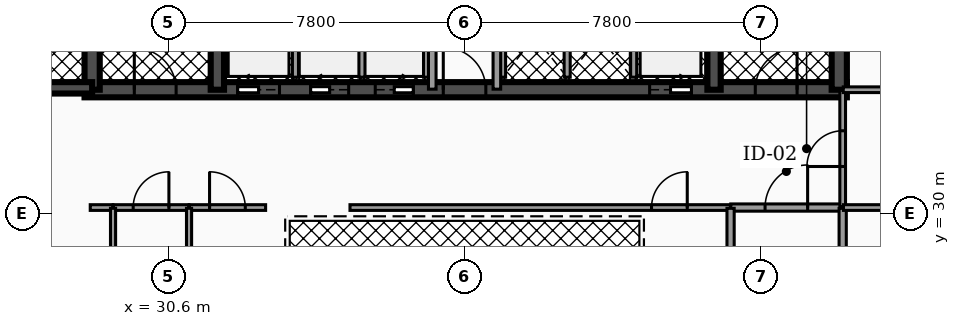
"""IFC4 building model, lengths in metres.
Left out: names, types, materials, properties, quantities, classifications, styles, units other than length and angle.
Written with IfcOpenShell. Run it as: python <this file> out.ifc"""

import sys

from ifc_helpers import new_model, si_unit, direction, frame, frame_2d, origin, place, context, subcontext, project, spatial, rectangle, extrude, element, fill, save


model = new_model("IFC4")
c1 = context("Model", 3, precision=1e-05, world=origin(), true_north=direction((0.0, 1.0)))
c2 = subcontext(c1, "Body", "Model", "MODEL_VIEW")
j1 = project(units=[si_unit("LENGTHUNIT", "METRE"), si_unit("PLANEANGLEUNIT", "RADIAN")], contexts=[c1])
p1 = place(None, origin())
s1 = spatial("IfcSite", under=j1, at=p1, CompositionType="ELEMENT")
p2 = place(p1, origin())
s2 = spatial("IfcBuilding", under=s1, at=p2, CompositionType="ELEMENT")
p3 = place(p2, frame((0.0, 0.0, 123.42)))
s3 = spatial("IfcBuildingStorey", under=s2, at=p3, CompositionType="ELEMENT", Elevation=123.42)
p4 = place(p3, frame((28.4, 33.25, 0.0), z_axis=(0.0, 0.0, 1.0), x_axis=(1.0, 0.0, 0.0)))
e1 = element("IfcWall", 1, at=p4, inside=s3, PredefinedType="SHEAR", context=c2, shape_type="SweptSolid", body=[
    extrude(rectangle(XDim=20.06, YDim=0.4, at=frame_2d((10.03, 0.0))), origin(), (0.0, 0.0, 1.0), 3.5),
])
p5 = place(p4, frame((4.03, 0.0, 0.0)))
e2 = element("IfcOpeningElement", 2, at=p5, cuts=e1, PredefinedType="OPENING", context=c2, shape_type="SweptSolid", body=[
    extrude(rectangle(XDim=1.1, YDim=2.15, at=frame_2d((0.55, 1.075))), frame((0.0, 0.21, 0.0), z_axis=(0.0, -1.0, 0.0), x_axis=(1.0, 0.0, 0.0)), (0.0, 0.0, 1.0), 0.42),
])
p6 = place(p4, frame((14.87, 0.0, 0.0)))
e3 = element("IfcOpeningElement", 3, at=p6, cuts=e1, PredefinedType="OPENING", context=c2, shape_type="SweptSolid", body=[
    extrude(rectangle(XDim=1.1, YDim=2.15, at=frame_2d((0.55, 1.075))), frame((0.0, 0.21, 0.0), z_axis=(0.0, -1.0, 0.0), x_axis=(1.0, 0.0, 0.0)), (0.0, 0.0, 1.0), 0.42),
])
p7 = place(p4, frame((5.95, 0.0, 0.0)))
e4 = element("IfcOpeningElement", 4, at=p7, cuts=e1, PredefinedType="OPENING", context=c2, shape_type="SweptSolid", body=[
    extrude(rectangle(XDim=1.0, YDim=2.1, at=frame_2d((0.5, 1.05))), frame((0.0, 0.21, 0.0), z_axis=(0.0, -1.0, 0.0), x_axis=(1.0, 0.0, 0.0)), (0.0, 0.0, 1.0), 0.42),
])
p8 = place(p4, frame((7.65, 0.0, 0.0)))
e5 = element("IfcOpeningElement", 5, at=p8, cuts=e1, PredefinedType="OPENING", context=c2, shape_type="SweptSolid", body=[
    extrude(rectangle(XDim=1.0, YDim=2.1, at=frame_2d((0.5, 1.05))), frame((0.0, 0.21, 0.0), z_axis=(0.0, -1.0, 0.0), x_axis=(1.0, 0.0, 0.0)), (0.0, 0.0, 1.0), 0.42),
])
p9 = place(p4, frame((1.31, 0.0, 0.0)))
e6 = element("IfcOpeningElement", 6, at=p9, cuts=e1, PredefinedType="OPENING", context=c2, shape_type="SweptSolid", body=[
    extrude(rectangle(XDim=1.1, YDim=2.2, at=frame_2d((0.55, 1.1))), frame((0.0, 0.21, 0.0), z_axis=(0.0, -1.0, 0.0), x_axis=(1.0, 0.0, 0.0)), (0.0, 0.0, 1.0), 0.42),
])
p10 = place(p4, frame((9.44, 0.0, 0.0)))
e7 = element("IfcOpeningElement", 7, at=p10, cuts=e1, PredefinedType="OPENING", context=c2, shape_type="SweptSolid", body=[
    extrude(rectangle(XDim=1.12, YDim=2.05, at=frame_2d((0.56, 1.025))), frame((0.0, 0.21, 0.0), z_axis=(0.0, -1.0, 0.0), x_axis=(1.0, 0.0, 0.0)), (0.0, 0.0, 1.0), 0.42),
])
p11 = place(p4, frame((17.65, 0.0, 0.0)))
e8 = element("IfcOpeningElement", 8, at=p11, cuts=e1, PredefinedType="OPENING", context=c2, shape_type="SweptSolid", body=[
    extrude(rectangle(XDim=1.1, YDim=2.2, at=frame_2d((0.55, 1.1))), frame((0.0, 0.21, 0.0), z_axis=(0.0, -1.0, 0.0), x_axis=(1.0, 0.0, 0.0)), (0.0, 0.0, 1.0), 0.42),
])
p12 = place(p3, frame((28.6, 33.25, 0.0), z_axis=(0.0, 0.0, 1.0), x_axis=(0.0, 1.0, 0.0)))
e9 = element("IfcWall", 9, at=p12, inside=s3, PredefinedType="SHEAR", context=c2, shape_type="SweptSolid", body=[
    extrude(rectangle(XDim=10.2, YDim=0.4, at=frame_2d((5.1, 0.0))), origin(), (0.0, 0.0, 1.0), 3.5),
])
for number, where, z_axis, x_axis in (
    (10, (31.895, 33.25, 0.0), (0.0, 0.0, 1.0), (0.0, 1.0, 0.0)),
    (11, (44.965, 33.25, 0.0), (0.0, 0.0, 1.0), (0.0, 1.0, 0.0)),
):
    element("IfcWall", number, at=place(p3, frame(where, z_axis=z_axis, x_axis=x_axis)), inside=s3, PredefinedType="SHEAR", context=c2, shape_type="SweptSolid", body=[
        extrude(rectangle(XDim=10.2, YDim=0.35, at=frame_2d((5.1, 0.0))), origin(), (0.0, 0.0, 1.0), 3.5),
    ])
p13 = place(p3, frame((48.26, 33.25, 0.0), z_axis=(0.0, 0.0, 1.0), x_axis=(0.0, 1.0, 0.0)))
e12 = element("IfcWall", 12, at=p13, inside=s3, PredefinedType="SHEAR", context=c2, shape_type="SweptSolid", body=[
    extrude(rectangle(XDim=10.2, YDim=0.4, at=frame_2d((5.1, 0.0))), origin(), (0.0, 0.0, 1.0), 3.5),
])
p14 = place(p3, frame((25.08, 33.3, 0.0), z_axis=(0.0, 0.0, 1.0), x_axis=(1.0, 0.0, 0.0)))
e13 = element("IfcWall", 13, at=p14, inside=s3, PredefinedType="SHEAR", context=c2, shape_type="SweptSolid", body=[
    extrude(rectangle(XDim=3.52, YDim=0.3, at=frame_2d((1.76, 0.0))), origin(), (0.0, 0.0, 1.0), 3.5),
])
p15 = place(p14, frame((1.335, 0.0, 0.0)))
e14 = element("IfcOpeningElement", 14, at=p15, cuts=e13, PredefinedType="OPENING", context=c2, shape_type="SweptSolid", body=[
    extrude(rectangle(XDim=0.95, YDim=2.2, at=frame_2d((0.475, 1.1))), frame((0.0, 0.16, 0.0), z_axis=(0.0, -1.0, 0.0), x_axis=(1.0, 0.0, 0.0)), (0.0, 0.0, 1.0), 0.32),
])
for number, where, z_axis, x_axis in (
    (15, (33.95, 33.58, 0.0), (0.0, 0.0, 1.0), (0.0, 1.0, 0.0)),
    (16, (42.85, 33.58, 0.0), (0.0, 0.0, 1.0), (0.0, 1.0, 0.0)),
):
    element("IfcWall", number, at=place(p3, frame(where, z_axis=z_axis, x_axis=x_axis)), inside=s3, PredefinedType="SOLIDWALL", context=c2, shape_type="SweptSolid", body=[
        extrude(rectangle(XDim=2.45, YDim=0.16, at=frame_2d((1.225, 0.0))), origin(), (0.0, 0.0, 1.0), 2.472),
    ])
for number, where, z_axis, x_axis in (
    (17, (35.7, 33.58, 0.0), (0.0, 0.0, 1.0), (0.0, 1.0, 0.0)),
    (18, (37.4, 33.58, 0.0), (0.0, 0.0, 1.0), (0.0, 1.0, 0.0)),
    (19, (39.4, 33.58, 0.0), (0.0, 0.0, 1.0), (0.0, 1.0, 0.0)),
    (20, (41.1, 33.58, 0.0), (0.0, 0.0, 1.0), (0.0, 1.0, 0.0)),
):
    element("IfcWall", number, at=place(p3, frame(where, z_axis=z_axis, x_axis=x_axis)), inside=s3, PredefinedType="SOLIDWALL", context=c2, shape_type="SweptSolid", body=[
        extrude(rectangle(XDim=2.25, YDim=0.16, at=frame_2d((1.125, 0.0))), origin(), (0.0, 0.0, 1.0), 2.472),
    ])
p16 = place(p3, frame((37.55, 33.265, 0.0), z_axis=(0.0, 0.0, 1.0), x_axis=(0.0, 1.0, 0.0)))
e21 = element("IfcWall", 21, at=p16, inside=s3, PredefinedType="PARTITIONING", context=c2, shape_type="SweptSolid", body=[
    extrude(rectangle(XDim=4.265, YDim=0.2, at=frame_2d((2.133, 0.0))), origin(), (0.0, 0.0, 1.0), 2.457),
])
p17 = place(p16, frame((3.093, 0.0, 0.0)))
e22 = element("IfcOpeningElement", 22, at=p17, cuts=e21, PredefinedType="OPENING", context=c2, shape_type="SweptSolid", body=[
    extrude(rectangle(XDim=0.88, YDim=2.05, at=frame_2d((0.44, 1.025))), frame((0.0, 0.11, 0.0), z_axis=(0.0, -1.0, 0.0), x_axis=(1.0, 0.0, 0.0)), (0.0, 0.0, 1.0), 0.22),
])
p18 = place(p3, frame((39.25, 33.265, 0.0), z_axis=(0.0, 0.0, 1.0), x_axis=(0.0, 1.0, 0.0)))
e23 = element("IfcWall", 23, at=p18, inside=s3, PredefinedType="PARTITIONING", context=c2, shape_type="SweptSolid", body=[
    extrude(rectangle(XDim=4.265, YDim=0.2, at=frame_2d((2.133, 0.0))), origin(), (0.0, 0.0, 1.0), 2.457),
])
p19 = place(p18, frame((3.093, 0.0, 0.0)))
e24 = element("IfcOpeningElement", 24, at=p19, cuts=e23, PredefinedType="OPENING", context=c2, shape_type="SweptSolid", body=[
    extrude(rectangle(XDim=0.88, YDim=2.05, at=frame_2d((0.44, 1.025))), frame((0.0, 0.11, 0.0), z_axis=(0.0, -1.0, 0.0), x_axis=(1.0, 0.0, 0.0)), (0.0, 0.0, 1.0), 0.22),
])
p20 = place(p3, frame((45.405, 30.15, 0.0), z_axis=(0.0, 0.0, 1.0), x_axis=(1.0, 0.0, 0.0)))
e25 = element("IfcWall", 25, at=p20, inside=s3, PredefinedType="PARTITIONING", context=c2, shape_type="SweptSolid", body=[
    extrude(rectangle(XDim=2.925, YDim=0.19, at=frame_2d((1.462, 0.0))), origin(), (0.0, 0.0, 1.0), 2.457),
])
p21 = place(p20, frame((0.903, 0.0, 0.0)))
e26 = element("IfcOpeningElement", 26, at=p21, cuts=e25, PredefinedType="OPENING", context=c2, shape_type="SweptSolid", body=[
    extrude(rectangle(XDim=1.12, YDim=2.05, at=frame_2d((0.56, 1.025))), frame((0.0, 0.105, 0.0), z_axis=(0.0, -1.0, 0.0), x_axis=(1.0, 0.0, 0.0)), (0.0, 0.0, 1.0), 0.21),
])
p22 = place(p3, frame((48.35, 30.17, 0.0), z_axis=(0.0, 0.0, 1.0), x_axis=(0.0, 1.0, 0.0)))
e27 = element("IfcWall", 27, at=p22, inside=s3, PredefinedType="PARTITIONING", context=c2, shape_type="SweptSolid", body=[
    extrude(rectangle(XDim=3.06, YDim=0.15, at=frame_2d((1.53, 0.0))), origin(), (0.0, 0.0, 1.0), 2.457),
])
p23 = place(p22, frame((1.06, 0.0, 0.0)))
e28 = element("IfcOpeningElement", 28, at=p23, cuts=e27, PredefinedType="OPENING", context=c2, shape_type="SweptSolid", body=[
    extrude(rectangle(XDim=0.94, YDim=2.05, at=frame_2d((0.47, 1.025))), frame((0.0, 0.085, 0.0), z_axis=(0.0, -1.0, 0.0), x_axis=(1.0, 0.0, 0.0)), (0.0, 0.0, 1.0), 0.17),
])
p24 = place(p3, frame((28.55, 30.15, 0.0), z_axis=(0.0, 0.0, 1.0), x_axis=(1.0, 0.0, 0.0)))
e29 = element("IfcWall", 29, at=p24, inside=s3, PredefinedType="PARTITIONING", context=c2, shape_type="SweptSolid", body=[
    extrude(rectangle(XDim=0.595, YDim=0.15, at=frame_2d((0.297, 0.0))), origin(), (0.0, 0.0, 1.0), 2.457),
])
p25 = place(p3, frame((29.155, 30.15, 0.0), z_axis=(0.0, 0.0, 1.0), x_axis=(1.0, 0.0, 0.0)))
e30 = element("IfcWall", 30, at=p25, inside=s3, PredefinedType="PARTITIONING", context=c2, shape_type="SweptSolid", body=[
    extrude(rectangle(XDim=1.99, YDim=0.15, at=frame_2d((0.995, 0.0))), origin(), (0.0, 0.0, 1.0), 2.457),
])
p26 = place(p25, frame((0.525, 0.0, 0.0)))
e31 = element("IfcOpeningElement", 31, at=p26, cuts=e30, PredefinedType="OPENING", context=c2, shape_type="SweptSolid", body=[
    extrude(rectangle(XDim=0.94, YDim=2.05, at=frame_2d((0.47, 1.025))), frame((0.0, 0.085, 0.0), z_axis=(0.0, -1.0, 0.0), x_axis=(1.0, 0.0, 0.0)), (0.0, 0.0, 1.0), 0.17),
])
p27 = place(p3, frame((31.155, 30.15, 0.0), z_axis=(0.0, 0.0, 1.0), x_axis=(1.0, 0.0, 0.0)))
e32 = element("IfcWall", 32, at=p27, inside=s3, PredefinedType="PARTITIONING", context=c2, shape_type="SweptSolid", body=[
    extrude(rectangle(XDim=2.01, YDim=0.15, at=frame_2d((1.005, 0.0))), origin(), (0.0, 0.0, 1.0), 2.457),
])
p28 = place(p27, frame((0.535, 0.0, 0.0)))
e33 = element("IfcOpeningElement", 33, at=p28, cuts=e32, PredefinedType="OPENING", context=c2, shape_type="SweptSolid", body=[
    extrude(rectangle(XDim=0.94, YDim=2.05, at=frame_2d((0.47, 1.025))), frame((0.0, 0.085, 0.0), z_axis=(0.0, -1.0, 0.0), x_axis=(1.0, 0.0, 0.0)), (0.0, 0.0, 1.0), 0.17),
])
p29 = place(p3, frame((35.385, 30.15, 0.0), z_axis=(0.0, 0.0, 1.0), x_axis=(1.0, 0.0, 0.0)))
e34 = element("IfcWall", 34, at=p29, inside=s3, PredefinedType="PARTITIONING", context=c2, shape_type="SweptSolid", body=[
    extrude(rectangle(XDim=10.01, YDim=0.15, at=frame_2d((5.005, 0.0))), origin(), (0.0, 0.0, 1.0), 2.457),
])
p30 = place(p29, frame((7.935, 0.0, 0.0)))
e35 = element("IfcOpeningElement", 35, at=p30, cuts=e34, PredefinedType="OPENING", context=c2, shape_type="SweptSolid", body=[
    extrude(rectangle(XDim=0.94, YDim=2.05, at=frame_2d((0.47, 1.025))), frame((0.0, 0.085, 0.0), z_axis=(0.0, -1.0, 0.0), x_axis=(1.0, 0.0, 0.0)), (0.0, 0.0, 1.0), 0.17),
])
for number, where, z_axis, x_axis in (
    (36, (45.4, 27.37, 0.0), (0.0, 0.0, 1.0), (0.0, 1.0, 0.0)),
    (37, (48.35, 27.37, 0.0), (0.0, 0.0, 1.0), (0.0, 1.0, 0.0)),
):
    element("IfcWall", number, at=place(p3, frame(where, z_axis=z_axis, x_axis=x_axis)), inside=s3, PredefinedType="PARTITIONING", context=c2, shape_type="SweptSolid", body=[
        extrude(rectangle(XDim=2.76, YDim=0.19, at=frame_2d((1.38, 0.0))), origin(), (0.0, 0.0, 1.0), 2.457),
    ])
p31 = place(p3, frame((48.37, 30.15, 0.0), z_axis=(0.0, 0.0, 1.0), x_axis=(1.0, 0.0, 0.0)))
e38 = element("IfcWall", 38, at=p31, inside=s3, PredefinedType="PARTITIONING", context=c2, shape_type="SweptSolid", body=[
    extrude(rectangle(XDim=3.26, YDim=0.15, at=frame_2d((1.63, 0.0))), origin(), (0.0, 0.0, 1.0), 2.457),
])
p32 = place(p31, frame((1.16, 0.0, 0.0)))
e39 = element("IfcOpeningElement", 39, at=p32, cuts=e38, PredefinedType="OPENING", context=c2, shape_type="SweptSolid", body=[
    extrude(rectangle(XDim=0.94, YDim=2.05, at=frame_2d((0.47, 1.025))), frame((0.0, 0.085, 0.0), z_axis=(0.0, -1.0, 0.0), x_axis=(1.0, 0.0, 0.0)), (0.0, 0.0, 1.0), 0.17),
])
p33 = place(p3, frame((48.365, 33.25, 0.0), z_axis=(0.0, 0.0, 1.0), x_axis=(1.0, 0.0, 0.0)))
e40 = element("IfcWall", 40, at=p33, inside=s3, PredefinedType="PARTITIONING", context=c2, shape_type="SweptSolid", body=[
    extrude(rectangle(XDim=3.265, YDim=0.15, at=frame_2d((1.632, 0.0))), origin(), (0.0, 0.0, 1.0), 2.457),
])
p34 = place(p3, frame((29.15, 27.17, 0.0), z_axis=(0.0, 0.0, 1.0), x_axis=(0.0, 1.0, 0.0)))
e41 = element("IfcWall", 41, at=p34, inside=s3, PredefinedType="PARTITIONING", context=c2, shape_type="SweptSolid", body=[
    extrude(rectangle(XDim=2.96, YDim=0.135, at=frame_2d((1.48, 0.0))), origin(), (0.0, 0.0, 1.0), 2.457),
])
p35 = place(p34, frame((1.05, 0.0, 0.0)))
e42 = element("IfcOpeningElement", 42, at=p35, cuts=e41, PredefinedType="OPENING", context=c2, shape_type="SweptSolid", body=[
    extrude(rectangle(XDim=0.86, YDim=2.05, at=frame_2d((0.43, 1.025))), frame((0.0, 0.077, 0.0), z_axis=(0.0, -1.0, 0.0), x_axis=(1.0, 0.0, 0.0)), (0.0, 0.0, 1.0), 0.155),
])
p36 = place(p3, frame((31.15, 27.17, 0.0), z_axis=(0.0, 0.0, 1.0), x_axis=(0.0, 1.0, 0.0)))
e43 = element("IfcWall", 43, at=p36, inside=s3, PredefinedType="PARTITIONING", context=c2, shape_type="SweptSolid", body=[
    extrude(rectangle(XDim=2.96, YDim=0.135, at=frame_2d((1.48, 0.0))), origin(), (0.0, 0.0, 1.0), 2.457),
])
p37 = place(p5, origin())
e44 = element("IfcDoor", 44, at=p37, inside=s3, OperationType="SLIDING_TO_LEFT", PredefinedType="DOOR", context=c2, shape_type="SweptSolid", body=[
    extrude(rectangle(XDim=1.1, YDim=2.15, at=frame_2d((0.55, 1.075))), frame((0.0, 0.025, 0.0), z_axis=(0.0, -1.0, 0.0), x_axis=(1.0, 0.0, 0.0)), (0.0, 0.0, 1.0), 0.05),
])
fill(e2, e44)
p38 = place(p6, origin())
e45 = element("IfcDoor", 45, at=p38, inside=s3, OperationType="SLIDING_TO_RIGHT", PredefinedType="DOOR", context=c2, shape_type="SweptSolid", body=[
    extrude(rectangle(XDim=1.1, YDim=2.15, at=frame_2d((0.55, 1.075))), frame((0.0, 0.025, 0.0), z_axis=(0.0, -1.0, 0.0), x_axis=(1.0, 0.0, 0.0)), (0.0, 0.0, 1.0), 0.05),
])
fill(e3, e45)
p39 = place(p7, origin())
e46 = element("IfcDoor", 46, at=p39, inside=s3, OperationType="SLIDING_TO_LEFT", PredefinedType="DOOR", context=c2, shape_type="SweptSolid", body=[
    extrude(rectangle(XDim=1.0, YDim=2.1, at=frame_2d((0.5, 1.05))), frame((0.0, 0.025, 0.0), z_axis=(0.0, -1.0, 0.0), x_axis=(1.0, 0.0, 0.0)), (0.0, 0.0, 1.0), 0.05),
])
fill(e4, e46)
p40 = place(p8, origin())
e47 = element("IfcDoor", 47, at=p40, inside=s3, OperationType="SLIDING_TO_RIGHT", PredefinedType="DOOR", context=c2, shape_type="SweptSolid", body=[
    extrude(rectangle(XDim=1.0, YDim=2.1, at=frame_2d((0.5, 1.05))), frame((0.0, 0.025, 0.0), z_axis=(0.0, -1.0, 0.0), x_axis=(1.0, 0.0, 0.0)), (0.0, 0.0, 1.0), 0.05),
])
fill(e5, e47)
p41 = place(p9, origin())
e48 = element("IfcDoor", 48, at=p41, inside=s3, OperationType="SINGLE_SWING_LEFT", PredefinedType="DOOR", context=c2, shape_type="SweptSolid", body=[
    extrude(rectangle(XDim=1.1, YDim=2.2, at=frame_2d((0.55, 1.1))), frame((0.0, 0.025, 0.0), z_axis=(0.0, -1.0, 0.0), x_axis=(1.0, 0.0, 0.0)), (0.0, 0.0, 1.0), 0.05),
])
fill(e6, e48)
p42 = place(p10, origin())
e49 = element("IfcDoor", 49, at=p42, inside=s3, OperationType="SINGLE_SWING_LEFT", PredefinedType="DOOR", context=c2, shape_type="SweptSolid", body=[
    extrude(rectangle(XDim=1.12, YDim=2.05, at=frame_2d((0.56, 1.025))), frame((0.0, 0.025, 0.0), z_axis=(0.0, -1.0, 0.0), x_axis=(1.0, 0.0, 0.0)), (0.0, 0.0, 1.0), 0.05),
])
fill(e7, e49)
p43 = place(p11, origin())
e50 = element("IfcDoor", 50, at=p43, inside=s3, OperationType="SINGLE_SWING_RIGHT", PredefinedType="DOOR", context=c2, shape_type="SweptSolid", body=[
    extrude(rectangle(XDim=1.1, YDim=2.2, at=frame_2d((0.55, 1.1))), frame((0.0, 0.025, 0.0), z_axis=(0.0, -1.0, 0.0), x_axis=(1.0, 0.0, 0.0)), (0.0, 0.0, 1.0), 0.05),
])
fill(e8, e50)
p44 = place(p21, origin())
e51 = element("IfcDoor", 51, at=p44, inside=s3, OperationType="SINGLE_SWING_RIGHT", PredefinedType="DOOR", context=c2, shape_type="SweptSolid", body=[
    extrude(rectangle(XDim=1.12, YDim=2.05, at=frame_2d((0.56, 1.025))), frame((0.0, 0.025, 0.0), z_axis=(0.0, -1.0, 0.0), x_axis=(1.0, 0.0, 0.0)), (0.0, 0.0, 1.0), 0.05),
])
fill(e26, e51)
p45 = place(p23, origin())
e52 = element("IfcDoor", 52, at=p45, inside=s3, OperationType="SINGLE_SWING_LEFT", PredefinedType="DOOR", context=c2, shape_type="SweptSolid", body=[
    extrude(rectangle(XDim=0.94, YDim=2.05, at=frame_2d((0.47, 1.025))), frame((0.0, 0.025, 0.0), z_axis=(0.0, -1.0, 0.0), x_axis=(1.0, 0.0, 0.0)), (0.0, 0.0, 1.0), 0.05),
])
fill(e28, e52)
p46 = place(p26, origin())
e53 = element("IfcDoor", 53, at=p46, inside=s3, OperationType="SINGLE_SWING_RIGHT", PredefinedType="DOOR", context=c2, shape_type="SweptSolid", body=[
    extrude(rectangle(XDim=0.94, YDim=2.05, at=frame_2d((0.47, 1.025))), frame((0.0, 0.025, 0.0), z_axis=(0.0, -1.0, 0.0), x_axis=(1.0, 0.0, 0.0)), (0.0, 0.0, 1.0), 0.05),
])
fill(e31, e53)
p47 = place(p28, origin())
e54 = element("IfcDoor", 54, at=p47, inside=s3, OperationType="SINGLE_SWING_LEFT", PredefinedType="DOOR", context=c2, shape_type="SweptSolid", body=[
    extrude(rectangle(XDim=0.94, YDim=2.05, at=frame_2d((0.47, 1.025))), frame((0.0, 0.025, 0.0), z_axis=(0.0, -1.0, 0.0), x_axis=(1.0, 0.0, 0.0)), (0.0, 0.0, 1.0), 0.05),
])
fill(e33, e54)
p48 = place(p30, origin())
e55 = element("IfcDoor", 55, at=p48, inside=s3, OperationType="SINGLE_SWING_RIGHT", PredefinedType="DOOR", context=c2, shape_type="SweptSolid", body=[
    extrude(rectangle(XDim=0.94, YDim=2.05, at=frame_2d((0.47, 1.025))), frame((0.0, 0.025, 0.0), z_axis=(0.0, -1.0, 0.0), x_axis=(1.0, 0.0, 0.0)), (0.0, 0.0, 1.0), 0.05),
])
fill(e35, e55)
save(model, sys.argv[1])
